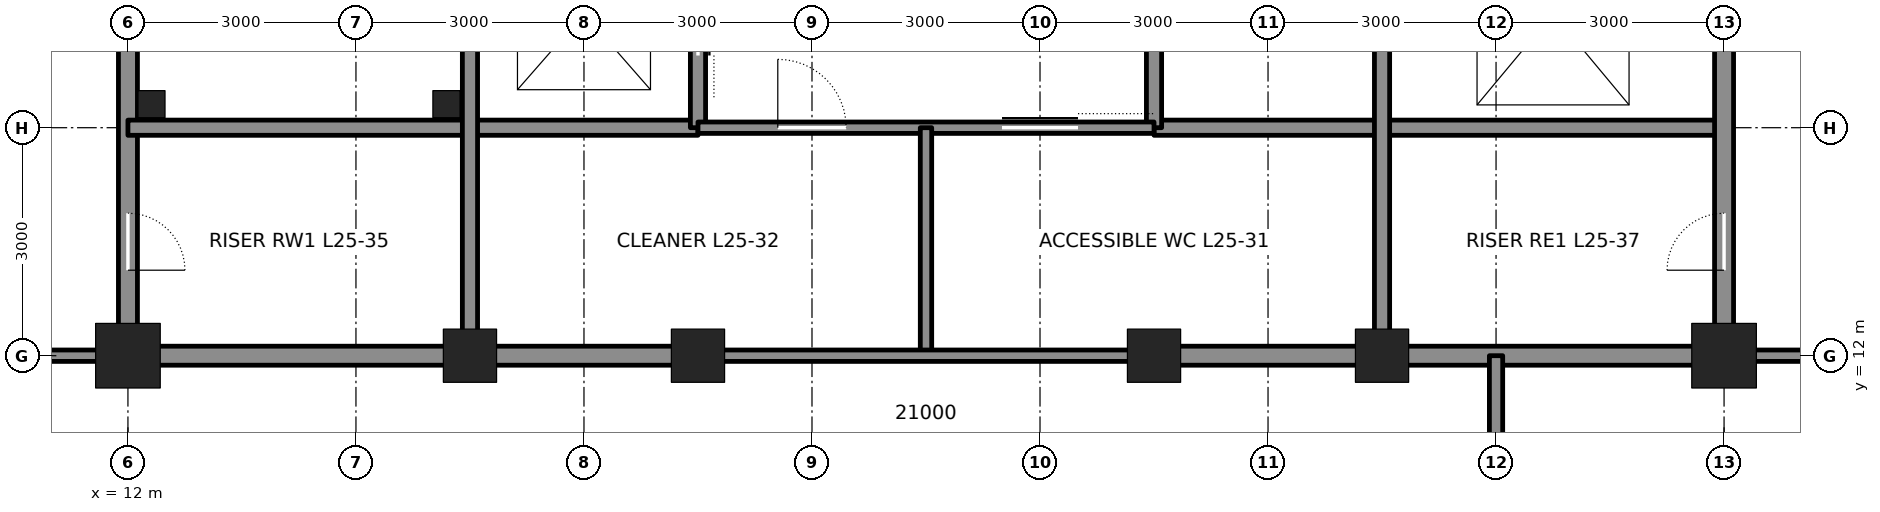
"""IFC4 building model, lengths in metres.
Left out: names, types, materials, properties, quantities, classifications, styles, units other than length and angle.
Written with IfcOpenShell. Run it as: python <this file> out.ifc"""

import sys

from ifc_helpers import new_model, si_unit, direction, frame, frame_2d, origin, origin_2d, place, context, subcontext, project, spatial, rectangle, hollow_rectangle, extrude, element, fill, save


model = new_model("IFC4")
c1 = context("Model", 3, precision=1e-05, world=origin(), true_north=direction((0.0, 1.0)))
c2 = subcontext(c1, "Body", "Model", "MODEL_VIEW")
j1 = project(units=[si_unit("LENGTHUNIT", "METRE"), si_unit("PLANEANGLEUNIT", "RADIAN")], contexts=[c1])
p1 = place(None, origin())
s1 = spatial("IfcSite", under=j1, at=p1, CompositionType="ELEMENT")
p2 = place(p1, origin())
s2 = spatial("IfcBuilding", under=s1, at=p2, CompositionType="ELEMENT")
p3 = place(p2, frame((0.0, 0.0, 119.4)))
s3 = spatial("IfcBuildingStorey", under=s2, at=p3, CompositionType="ELEMENT", Elevation=119.4)
p4 = place(p3, frame((12.0, 12.0, 0.0), z_axis=(0.0, 0.0, 1.0), x_axis=(1.0, 0.0, 0.0)))
e1 = element("IfcColumn", 1, at=p4, inside=s3, PredefinedType="COLUMN", context=c2, shape_type="SweptSolid", body=[
    extrude(hollow_rectangle(XDim=0.85, YDim=0.85, WallThickness=0.085, at=origin_2d()), origin(), (0.0, 0.0, 1.0), 4.2),
])
for number, where, z_axis, x_axis in (
    (2, (16.5, 12.0, 0.0), (0.0, 0.0, 1.0), (1.0, 0.0, 0.0)),
    (3, (19.5, 12.0, 0.0), (0.0, 0.0, 1.0), (1.0, 0.0, 0.0)),
    (4, (25.5, 12.0, 0.0), (0.0, 0.0, 1.0), (1.0, 0.0, 0.0)),
    (5, (28.5, 12.0, 0.0), (0.0, 0.0, 1.0), (1.0, 0.0, 0.0)),
):
    element("IfcColumn", number, at=place(p3, frame(where, z_axis=z_axis, x_axis=x_axis)), inside=s3, PredefinedType="COLUMN", context=c2, shape_type="SweptSolid", body=[
        extrude(hollow_rectangle(XDim=0.7, YDim=0.7, WallThickness=0.07, at=origin_2d()), origin(), (0.0, 0.0, 1.0), 4.2),
    ])
p5 = place(p3, frame((33.0, 12.0, 0.0), z_axis=(0.0, 0.0, 1.0), x_axis=(1.0, 0.0, 0.0)))
e6 = element("IfcColumn", 6, at=p5, inside=s3, PredefinedType="COLUMN", context=c2, shape_type="SweptSolid", body=[
    extrude(hollow_rectangle(XDim=0.85, YDim=0.85, WallThickness=0.085, at=origin_2d()), origin(), (0.0, 0.0, 1.0), 4.2),
])
p6 = place(p3, frame((12.0, 12.25, 0.0), z_axis=(0.0, 0.0, 1.0), x_axis=(0.0, 1.0, 0.0)))
e7 = element("IfcWall", 7, at=p6, inside=s3, PredefinedType="SOLIDWALL", context=c2, shape_type="SweptSolid", body=[
    extrude(rectangle(XDim=8.5, YDim=0.25, at=frame_2d((4.25, 0.0))), origin(), (0.0, 0.0, 1.0), 3.113),
])
p7 = place(p6, frame((0.875, 0.0, 0.0)))
e8 = element("IfcOpeningElement", 8, at=p7, cuts=e7, PredefinedType="OPENING", context=c2, shape_type="SweptSolid", body=[
    extrude(rectangle(XDim=0.75, YDim=2.1, at=frame_2d((0.375, 1.05))), frame((0.0, 0.135, 0.0), z_axis=(0.0, -1.0, 0.0), x_axis=(1.0, 0.0, 0.0)), (0.0, 0.0, 1.0), 0.27),
])
p8 = place(p3, frame((12.25, 12.0, 0.0), z_axis=(0.0, 0.0, 1.0), x_axis=(1.0, 0.0, 0.0)))
e9 = element("IfcWall", 9, at=p8, inside=s3, PredefinedType="SOLIDWALL", context=c2, shape_type="SweptSolid", body=[
    extrude(rectangle(XDim=4.0, YDim=0.25, at=frame_2d((2.0, 0.0))), origin(), (0.0, 0.0, 1.0), 3.182),
])
for number, where, z_axis, x_axis in (
    (10, (16.75, 12.0, 0.0), (0.0, 0.0, 1.0), (1.0, 0.0, 0.0)),
    (11, (25.75, 12.0, 0.0), (0.0, 0.0, 1.0), (1.0, 0.0, 0.0)),
):
    element("IfcWall", number, at=place(p3, frame(where, z_axis=z_axis, x_axis=x_axis)), inside=s3, PredefinedType="SOLIDWALL", context=c2, shape_type="SweptSolid", body=[
        extrude(rectangle(XDim=2.5, YDim=0.25, at=frame_2d((1.25, 0.0))), origin(), (0.0, 0.0, 1.0), 3.182),
    ])
p9 = place(p3, frame((28.75, 12.0, 0.0), z_axis=(0.0, 0.0, 1.0), x_axis=(1.0, 0.0, 0.0)))
e12 = element("IfcWall", 12, at=p9, inside=s3, PredefinedType="SOLIDWALL", context=c2, shape_type="SweptSolid", body=[
    extrude(rectangle(XDim=4.0, YDim=0.25, at=frame_2d((2.0, 0.0))), origin(), (0.0, 0.0, 1.0), 3.182),
])
for number, where, z_axis, x_axis in (
    (13, (12.0, 15.0, 0.0), (0.0, 0.0, 1.0), (1.0, 0.0, 0.0)),
    (14, (25.5, 15.0, 0.0), (0.0, 0.0, 1.0), (1.0, 0.0, 0.0)),
):
    element("IfcWall", number, at=place(p3, frame(where, z_axis=z_axis, x_axis=x_axis)), inside=s3, PredefinedType="SOLIDWALL", context=c2, shape_type="SweptSolid", body=[
        extrude(rectangle(XDim=7.5, YDim=0.2, at=frame_2d((3.75, 0.0))), origin(), (0.0, 0.0, 1.0), 4.04),
    ])
p10 = place(p3, frame((16.5, 12.25, 0.0), z_axis=(0.0, 0.0, 1.0), x_axis=(0.0, 1.0, 0.0)))
e15 = element("IfcWall", 15, at=p10, inside=s3, PredefinedType="SOLIDWALL", context=c2, shape_type="SweptSolid", body=[
    extrude(rectangle(XDim=8.5, YDim=0.2, at=frame_2d((4.25, 0.0))), origin(), (0.0, 0.0, 1.0), 3.113),
])
p11 = place(p3, frame((19.5, 15.0, 0.0), z_axis=(0.0, 0.0, 1.0), x_axis=(0.0, 1.0, 0.0)))
e16 = element("IfcWall", 16, at=p11, inside=s3, PredefinedType="SOLIDWALL", context=c2, shape_type="SweptSolid", body=[
    extrude(rectangle(XDim=12.0, YDim=0.2, at=frame_2d((6.0, 0.0))), origin(), (0.0, 0.0, 1.0), 3.065),
])
p12 = place(p11, frame((0.95, 0.0, 0.0)))
e17 = element("IfcOpeningElement", 17, at=p12, cuts=e16, PredefinedType="OPENING", context=c2, shape_type="SweptSolid", body=[
    extrude(rectangle(XDim=1.1, YDim=2.1, at=frame_2d((0.55, 1.05))), frame((0.0, 0.11, 0.0), z_axis=(0.0, -1.0, 0.0), x_axis=(1.0, 0.0, 0.0)), (0.0, 0.0, 1.0), 0.22),
])
p13 = place(p11, frame((3.95, 0.0, 0.0)))
e18 = element("IfcOpeningElement", 18, at=p13, cuts=e16, PredefinedType="OPENING", context=c2, shape_type="SweptSolid", body=[
    extrude(rectangle(XDim=1.1, YDim=2.1, at=frame_2d((0.55, 1.05))), frame((0.0, 0.11, 0.0), z_axis=(0.0, -1.0, 0.0), x_axis=(1.0, 0.0, 0.0)), (0.0, 0.0, 1.0), 0.22),
])
p14 = place(p11, frame((6.95, 0.0, 0.0)))
e19 = element("IfcOpeningElement", 19, at=p14, cuts=e16, PredefinedType="OPENING", context=c2, shape_type="SweptSolid", body=[
    extrude(rectangle(XDim=1.1, YDim=2.1, at=frame_2d((0.55, 1.05))), frame((0.0, 0.11, 0.0), z_axis=(0.0, -1.0, 0.0), x_axis=(1.0, 0.0, 0.0)), (0.0, 0.0, 1.0), 0.22),
])
p15 = place(p11, frame((9.95, 0.0, 0.0)))
e20 = element("IfcOpeningElement", 20, at=p15, cuts=e16, PredefinedType="OPENING", context=c2, shape_type="SweptSolid", body=[
    extrude(rectangle(XDim=1.1, YDim=2.1, at=frame_2d((0.55, 1.05))), frame((0.0, 0.11, 0.0), z_axis=(0.0, -1.0, 0.0), x_axis=(1.0, 0.0, 0.0)), (0.0, 0.0, 1.0), 0.22),
])
p16 = place(p3, frame((25.5, 15.0, 0.0), z_axis=(0.0, 0.0, 1.0), x_axis=(0.0, 1.0, 0.0)))
e21 = element("IfcWall", 21, at=p16, inside=s3, PredefinedType="SOLIDWALL", context=c2, shape_type="SweptSolid", body=[
    extrude(rectangle(XDim=12.0, YDim=0.2, at=frame_2d((6.0, 0.0))), origin(), (0.0, 0.0, 1.0), 3.065),
])
p17 = place(p3, frame((28.5, 12.25, 0.0), z_axis=(0.0, 0.0, 1.0), x_axis=(0.0, 1.0, 0.0)))
e22 = element("IfcWall", 22, at=p17, inside=s3, PredefinedType="SOLIDWALL", context=c2, shape_type="SweptSolid", body=[
    extrude(rectangle(XDim=8.5, YDim=0.2, at=frame_2d((4.25, 0.0))), origin(), (0.0, 0.0, 1.0), 3.113),
])
p18 = place(p3, frame((33.0, 12.25, 0.0), z_axis=(0.0, 0.0, 1.0), x_axis=(0.0, 1.0, 0.0)))
e23 = element("IfcWall", 23, at=p18, inside=s3, PredefinedType="SOLIDWALL", context=c2, shape_type="SweptSolid", body=[
    extrude(rectangle(XDim=8.5, YDim=0.25, at=frame_2d((4.25, 0.0))), origin(), (0.0, 0.0, 1.0), 3.113),
])
p19 = place(p18, frame((6.65, 0.0, 0.0)))
e24 = element("IfcOpeningElement", 24, at=p19, cuts=e23, PredefinedType="OPENING", context=c2, shape_type="SweptSolid", body=[
    extrude(rectangle(XDim=1.2, YDim=2.1, at=frame_2d((0.6, 1.05))), frame((0.0, 0.135, 0.0), z_axis=(0.0, -1.0, 0.0), x_axis=(1.0, 0.0, 0.0)), (0.0, 0.0, 1.0), 0.27),
])
p20 = place(p18, frame((0.875, 0.0, 0.0)))
e25 = element("IfcOpeningElement", 25, at=p20, cuts=e23, PredefinedType="OPENING", context=c2, shape_type="SweptSolid", body=[
    extrude(rectangle(XDim=0.75, YDim=2.1, at=frame_2d((0.375, 1.05))), frame((0.0, 0.135, 0.0), z_axis=(0.0, -1.0, 0.0), x_axis=(1.0, 0.0, 0.0)), (0.0, 0.0, 1.0), 0.27),
])
p21 = place(p3, frame((19.5, 15.0, 0.0), z_axis=(0.0, 0.0, 1.0), x_axis=(1.0, 0.0, 0.0)))
e26 = element("IfcWall", 26, at=p21, inside=s3, PredefinedType="PARTITIONING", context=c2, shape_type="SweptSolid", body=[
    extrude(rectangle(XDim=6.0, YDim=0.15, at=frame_2d((3.0, 0.0))), origin(), (0.0, 0.0, 1.0), 4.04),
])
p22 = place(p21, frame((4.0, 0.0, 0.0)))
e27 = element("IfcOpeningElement", 27, at=p22, cuts=e26, PredefinedType="OPENING", context=c2, shape_type="SweptSolid", body=[
    extrude(rectangle(XDim=1.0, YDim=2.1, at=frame_2d((0.5, 1.05))), frame((0.0, 0.085, 0.0), z_axis=(0.0, -1.0, 0.0), x_axis=(1.0, 0.0, 0.0)), (0.0, 0.0, 1.0), 0.17),
])
p23 = place(p21, frame((1.05, 0.0, 0.0)))
e28 = element("IfcOpeningElement", 28, at=p23, cuts=e26, PredefinedType="OPENING", context=c2, shape_type="SweptSolid", body=[
    extrude(rectangle(XDim=0.9, YDim=2.1, at=frame_2d((0.45, 1.05))), frame((0.0, 0.085, 0.0), z_axis=(0.0, -1.0, 0.0), x_axis=(1.0, 0.0, 0.0)), (0.0, 0.0, 1.0), 0.17),
])
p24 = place(p3, frame((22.5, 15.0, 0.0), z_axis=(0.0, 0.0, 1.0), x_axis=(0.0, -1.0, 0.0)))
e29 = element("IfcWall", 29, at=p24, inside=s3, PredefinedType="PARTITIONING", context=c2, shape_type="SweptSolid", body=[
    extrude(rectangle(XDim=3.0, YDim=0.15, at=frame_2d((1.5, 0.0))), origin(), (0.0, 0.0, 1.0), 4.04),
])
p25 = place(p3, frame((19.5, 12.0, 0.0), z_axis=(0.0, 0.0, 1.0), x_axis=(1.0, 0.0, 0.0)))
e30 = element("IfcWall", 30, at=p25, inside=s3, PredefinedType="PARTITIONING", context=c2, shape_type="SweptSolid", body=[
    extrude(rectangle(XDim=6.0, YDim=0.15, at=frame_2d((3.0, 0.0))), origin(), (0.0, 0.0, 1.0), 3.182),
])
for number, where, z_axis, x_axis in (
    (31, (10.2, 12.0, 0.0), (0.0, 0.0, 1.0), (1.0, 0.0, 0.0)),
    (32, (33.0, 12.0, 0.0), (0.0, 0.0, 1.0), (1.0, 0.0, 0.0)),
):
    element("IfcWall", number, at=place(p3, frame(where, z_axis=z_axis, x_axis=x_axis)), inside=s3, PredefinedType="PARTITIONING", context=c2, shape_type="SweptSolid", body=[
        extrude(rectangle(XDim=1.8, YDim=0.15, at=frame_2d((0.9, 0.0))), origin(), (0.0, 0.0, 1.0), 3.271),
    ])
p26 = place(p3, frame((30.0, 0.653, 0.0), z_axis=(0.0, 0.0, 1.0), x_axis=(0.0, 1.0, 0.0)))
e33 = element("IfcWall", 33, at=p26, inside=s3, PredefinedType="PARTITIONING", context=c2, shape_type="SweptSolid", body=[
    extrude(rectangle(XDim=11.347, YDim=0.175, at=frame_2d((5.674, 0.0))), origin(), (0.0, 0.0, 1.0), 3.357),
])
for number, where, z_axis, x_axis in (
    (34, (12.31, 15.31, 0.0), (0.0, 0.0, 1.0), (1.0, 0.0, 0.0)),
    (35, (16.19, 15.31, 0.0), (0.0, 0.0, 1.0), (1.0, 0.0, 0.0)),
):
    element("IfcColumn", number, at=place(p3, frame(where, z_axis=z_axis, x_axis=x_axis)), inside=s3, PredefinedType="COLUMN", context=c2, shape_type="SweptSolid", body=[
        extrude(hollow_rectangle(XDim=0.356, YDim=0.356, WallThickness=0.015, at=origin_2d()), origin(), (0.0, 0.0, 1.0), 4.2),
    ])
p27 = place(p7, frame((0.75, 0.0, 0.0), z_axis=(0.0, 0.0, 1.0), x_axis=(-1.0, 0.0, 0.0)))
e36 = element("IfcDoor", 36, at=p27, inside=s3, OperationType="SINGLE_SWING_RIGHT", PredefinedType="DOOR", context=c2, shape_type="SweptSolid", body=[
    extrude(rectangle(XDim=0.75, YDim=2.1, at=frame_2d((0.375, 1.05))), frame((0.0, 0.025, 0.0), z_axis=(0.0, -1.0, 0.0), x_axis=(1.0, 0.0, 0.0)), (0.0, 0.0, 1.0), 0.05),
])
fill(e8, e36)
p28 = place(p20, origin())
e37 = element("IfcDoor", 37, at=p28, inside=s3, OperationType="SINGLE_SWING_LEFT", PredefinedType="DOOR", context=c2, shape_type="SweptSolid", body=[
    extrude(rectangle(XDim=0.75, YDim=2.1, at=frame_2d((0.375, 1.05))), frame((0.0, 0.025, 0.0), z_axis=(0.0, -1.0, 0.0), x_axis=(1.0, 0.0, 0.0)), (0.0, 0.0, 1.0), 0.05),
])
fill(e25, e37)
p29 = place(p22, origin())
e38 = element("IfcDoor", 38, at=p29, inside=s3, OperationType="SLIDING_TO_LEFT", PredefinedType="DOOR", context=c2, shape_type="SweptSolid", body=[
    extrude(rectangle(XDim=1.0, YDim=2.1, at=frame_2d((0.5, 1.05))), frame((0.0, 0.025, 0.0), z_axis=(0.0, -1.0, 0.0), x_axis=(1.0, 0.0, 0.0)), (0.0, 0.0, 1.0), 0.05),
])
fill(e27, e38)
p30 = place(p23, origin())
e39 = element("IfcDoor", 39, at=p30, inside=s3, OperationType="SINGLE_SWING_LEFT", PredefinedType="DOOR", context=c2, shape_type="SweptSolid", body=[
    extrude(rectangle(XDim=0.9, YDim=2.1, at=frame_2d((0.45, 1.05))), frame((0.0, 0.025, 0.0), z_axis=(0.0, -1.0, 0.0), x_axis=(1.0, 0.0, 0.0)), (0.0, 0.0, 1.0), 0.05),
])
fill(e28, e39)
p31 = place(p12, origin())
e40 = element("IfcDoor", 40, at=p31, inside=s3, OperationType="DOUBLE_DOOR_SLIDING", PredefinedType="DOOR", context=c2, shape_type="SweptSolid", body=[
    extrude(rectangle(XDim=1.1, YDim=2.1, at=frame_2d((0.55, 1.05))), frame((0.0, 0.025, 0.0), z_axis=(0.0, -1.0, 0.0), x_axis=(1.0, 0.0, 0.0)), (0.0, 0.0, 1.0), 0.05),
])
fill(e17, e40)
save(model, sys.argv[1])
